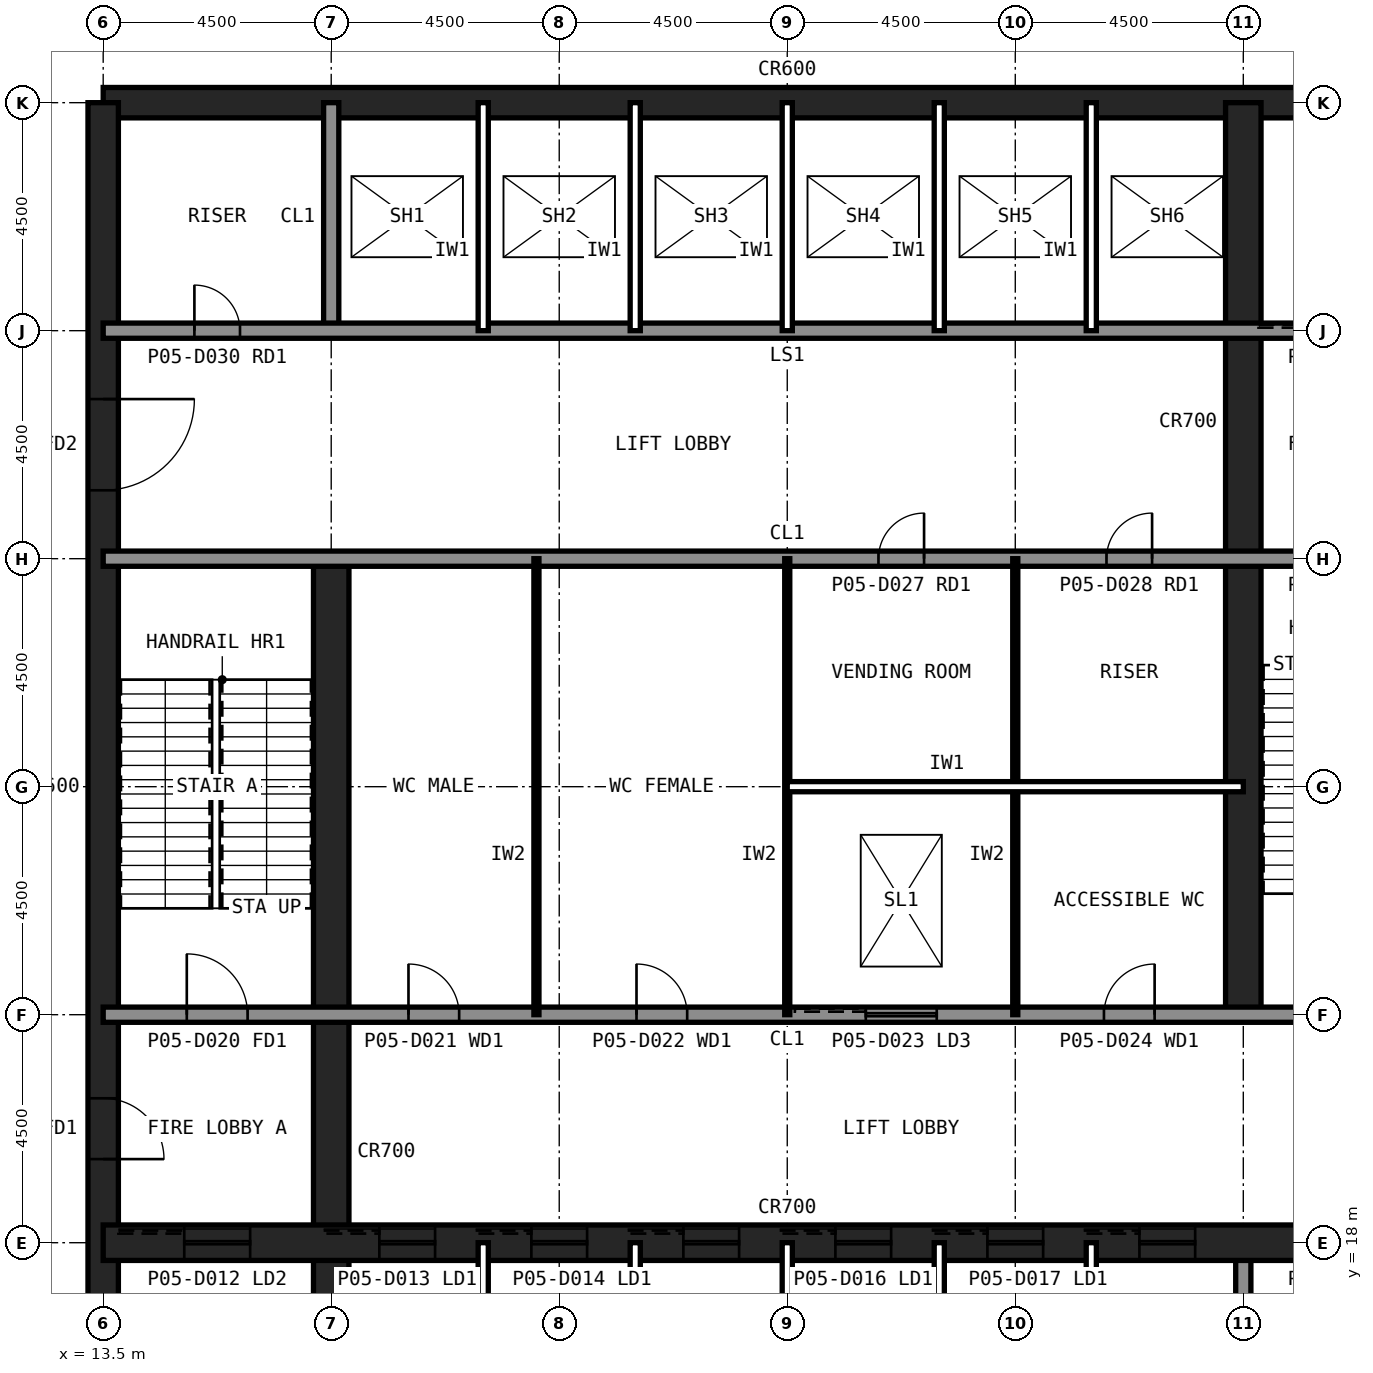
"""IFC4 building model, lengths in metres.
Left out: names, types, materials, properties, quantities, classifications, styles, units other than length and angle.
Written with IfcOpenShell. Run it as: python <this file> out.ifc"""

import sys

from ifc_helpers import new_model, si_unit, direction, frame, frame_2d, origin, place, context, subcontext, project, spatial, rectangle, extrude, element, fill, save


model = new_model("IFC4")
c1 = context("Model", 3, precision=1e-05, world=origin(), true_north=direction((0.0, 1.0)))
c2 = subcontext(c1, "Body", "Model", "MODEL_VIEW")
j1 = project(units=[si_unit("LENGTHUNIT", "METRE"), si_unit("PLANEANGLEUNIT", "RADIAN")], contexts=[c1])
p1 = place(None, origin())
s1 = spatial("IfcSite", under=j1, at=p1, CompositionType="ELEMENT")
p2 = place(p1, origin())
s2 = spatial("IfcBuilding", under=s1, at=p2, CompositionType="ELEMENT")
p3 = place(p2, frame((0.0, 0.0, 23.0)))
s3 = spatial("IfcBuildingStorey", under=s2, at=p3, CompositionType="ELEMENT", Elevation=23.0)
p4 = place(p3, frame((40.5, 40.5, 0.0), z_axis=(0.0, 0.0, 1.0), x_axis=(-1.0, 0.0, 0.0)))
e1 = element("IfcWall", 1, at=p4, inside=s3, PredefinedType="SHEAR", context=c2, shape_type="SweptSolid", body=[
    extrude(rectangle(XDim=27.0, YDim=0.6, at=frame_2d((13.5, 0.0))), origin(), (0.0, 0.0, 1.0), 6.0),
])
p5 = place(p3, frame((13.5, 40.5, 0.0), z_axis=(0.0, 0.0, 1.0), x_axis=(0.0, -1.0, 0.0)))
e2 = element("IfcWall", 2, at=p5, inside=s3, PredefinedType="SHEAR", context=c2, shape_type="SweptSolid", body=[
    extrude(rectangle(XDim=27.0, YDim=0.6, at=frame_2d((13.5, 0.0))), origin(), (0.0, 0.0, 1.0), 6.0),
])
p6 = place(p5, frame((19.65, 0.0, 0.0)))
e3 = element("IfcOpeningElement", 3, at=p6, cuts=e2, PredefinedType="OPENING", context=c2, shape_type="SweptSolid", body=[
    extrude(rectangle(XDim=1.2, YDim=2.1, at=frame_2d((0.6, 1.05))), frame((0.0, 0.31, 0.0), z_axis=(0.0, -1.0, 0.0), x_axis=(1.0, 0.0, 0.0)), (0.0, 0.0, 1.0), 0.62),
])
p7 = place(p5, frame((5.85, 0.0, 0.0)))
e4 = element("IfcOpeningElement", 4, at=p7, cuts=e2, PredefinedType="OPENING", context=c2, shape_type="SweptSolid", body=[
    extrude(rectangle(XDim=1.8, YDim=2.1, at=frame_2d((0.9, 1.05))), frame((0.0, 0.31, 0.0), z_axis=(0.0, -1.0, 0.0), x_axis=(1.0, 0.0, 0.0)), (0.0, 0.0, 1.0), 0.62),
])
p8 = place(p3, frame((18.0, 13.5, 0.0), z_axis=(0.0, 0.0, 1.0), x_axis=(0.0, 1.0, 0.0)))
e5 = element("IfcWall", 5, at=p8, inside=s3, PredefinedType="SHEAR", context=c2, shape_type="SweptSolid", body=[
    extrude(rectangle(XDim=18.0, YDim=0.7, at=frame_2d((9.0, 0.0))), origin(), (0.0, 0.0, 1.0), 6.0),
])
for number, where, z_axis, x_axis in (
    (6, (18.0, 36.0, 0.0), (0.0, 0.0, 1.0), (0.0, 1.0, 0.0)),
    (7, (36.0, 13.5, 0.0), (0.0, 0.0, 1.0), (0.0, 1.0, 0.0)),
):
    element("IfcWall", number, at=place(p3, frame(where, z_axis=z_axis, x_axis=x_axis)), inside=s3, PredefinedType="SOLIDWALL", context=c2, shape_type="SweptSolid", body=[
        extrude(rectangle(XDim=4.5, YDim=0.3, at=frame_2d((2.25, 0.0))), origin(), (0.0, 0.0, 1.0), 5.84),
    ])
p9 = place(p3, frame((36.0, 22.5, 0.0), z_axis=(0.0, 0.0, 1.0), x_axis=(0.0, 1.0, 0.0)))
e8 = element("IfcWall", 8, at=p9, inside=s3, PredefinedType="SHEAR", context=c2, shape_type="SweptSolid", body=[
    extrude(rectangle(XDim=18.0, YDim=0.7, at=frame_2d((9.0, 0.0))), origin(), (0.0, 0.0, 1.0), 6.0),
])
p10 = place(p3, frame((13.5, 18.0, 0.0), z_axis=(0.0, 0.0, 1.0), x_axis=(1.0, 0.0, 0.0)))
e9 = element("IfcWall", 9, at=p10, inside=s3, PredefinedType="SHEAR", context=c2, shape_type="SweptSolid", body=[
    extrude(rectangle(XDim=27.0, YDim=0.7, at=frame_2d((13.5, 0.0))), origin(), (0.0, 0.0, 1.0), 6.0),
])
p11 = place(p10, frame((24.3, 0.0, 0.0)))
e10 = element("IfcOpeningElement", 10, at=p11, cuts=e9, PredefinedType="OPENING", context=c2, shape_type="SweptSolid", body=[
    extrude(rectangle(XDim=0.9, YDim=2.1, at=frame_2d((0.45, 1.05))), frame((0.0, 0.36, 0.0), z_axis=(0.0, -1.0, 0.0), x_axis=(1.0, 0.0, 0.0)), (0.0, 0.0, 1.0), 0.72),
])
p12 = place(p10, frame((5.45, 0.0, 0.0)))
e11 = element("IfcOpeningElement", 11, at=p12, cuts=e9, PredefinedType="OPENING", context=c2, shape_type="SweptSolid", body=[
    extrude(rectangle(XDim=1.1, YDim=2.1, at=frame_2d((0.55, 1.05))), frame((0.0, 0.36, 0.0), z_axis=(0.0, -1.0, 0.0), x_axis=(1.0, 0.0, 0.0)), (0.0, 0.0, 1.0), 0.72),
])
p13 = place(p10, frame((8.45, 0.0, 0.0)))
e12 = element("IfcOpeningElement", 12, at=p13, cuts=e9, PredefinedType="OPENING", context=c2, shape_type="SweptSolid", body=[
    extrude(rectangle(XDim=1.1, YDim=2.1, at=frame_2d((0.55, 1.05))), frame((0.0, 0.36, 0.0), z_axis=(0.0, -1.0, 0.0), x_axis=(1.0, 0.0, 0.0)), (0.0, 0.0, 1.0), 0.72),
])
p14 = place(p10, frame((11.45, 0.0, 0.0)))
e13 = element("IfcOpeningElement", 13, at=p14, cuts=e9, PredefinedType="OPENING", context=c2, shape_type="SweptSolid", body=[
    extrude(rectangle(XDim=1.1, YDim=2.1, at=frame_2d((0.55, 1.05))), frame((0.0, 0.36, 0.0), z_axis=(0.0, -1.0, 0.0), x_axis=(1.0, 0.0, 0.0)), (0.0, 0.0, 1.0), 0.72),
])
p15 = place(p10, frame((14.45, 0.0, 0.0)))
e14 = element("IfcOpeningElement", 14, at=p15, cuts=e9, PredefinedType="OPENING", context=c2, shape_type="SweptSolid", body=[
    extrude(rectangle(XDim=1.1, YDim=2.1, at=frame_2d((0.55, 1.05))), frame((0.0, 0.36, 0.0), z_axis=(0.0, -1.0, 0.0), x_axis=(1.0, 0.0, 0.0)), (0.0, 0.0, 1.0), 0.72),
])
p16 = place(p10, frame((17.45, 0.0, 0.0)))
e15 = element("IfcOpeningElement", 15, at=p16, cuts=e9, PredefinedType="OPENING", context=c2, shape_type="SweptSolid", body=[
    extrude(rectangle(XDim=1.1, YDim=2.1, at=frame_2d((0.55, 1.05))), frame((0.0, 0.36, 0.0), z_axis=(0.0, -1.0, 0.0), x_axis=(1.0, 0.0, 0.0)), (0.0, 0.0, 1.0), 0.72),
])
p17 = place(p10, frame((20.45, 0.0, 0.0)))
e16 = element("IfcOpeningElement", 16, at=p17, cuts=e9, PredefinedType="OPENING", context=c2, shape_type="SweptSolid", body=[
    extrude(rectangle(XDim=1.1, YDim=2.1, at=frame_2d((0.55, 1.05))), frame((0.0, 0.36, 0.0), z_axis=(0.0, -1.0, 0.0), x_axis=(1.0, 0.0, 0.0)), (0.0, 0.0, 1.0), 0.72),
])
p18 = place(p10, frame((1.6, 0.0, 0.0)))
e17 = element("IfcOpeningElement", 17, at=p18, cuts=e9, PredefinedType="OPENING", context=c2, shape_type="SweptSolid", body=[
    extrude(rectangle(XDim=1.3, YDim=2.2, at=frame_2d((0.65, 1.1))), frame((0.0, 0.36, 0.0), z_axis=(0.0, -1.0, 0.0), x_axis=(1.0, 0.0, 0.0)), (0.0, 0.0, 1.0), 0.72),
])
p19 = place(p3, frame((13.5, 36.0, 0.0), z_axis=(0.0, 0.0, 1.0), x_axis=(1.0, 0.0, 0.0)))
e18 = element("IfcWall", 18, at=p19, inside=s3, PredefinedType="SOLIDWALL", context=c2, shape_type="SweptSolid", body=[
    extrude(rectangle(XDim=27.0, YDim=0.3, at=frame_2d((13.5, 0.0))), origin(), (0.0, 0.0, 1.0), 5.84),
])
p20 = place(p19, frame((1.8, 0.0, 0.0)))
e19 = element("IfcOpeningElement", 19, at=p20, cuts=e18, PredefinedType="OPENING", context=c2, shape_type="SweptSolid", body=[
    extrude(rectangle(XDim=0.9, YDim=2.1, at=frame_2d((0.45, 1.05))), frame((0.0, 0.16, 0.0), z_axis=(0.0, -1.0, 0.0), x_axis=(1.0, 0.0, 0.0)), (0.0, 0.0, 1.0), 0.32),
])
p21 = place(p19, frame((24.1, 0.0, 0.0)))
e20 = element("IfcOpeningElement", 20, at=p21, cuts=e18, PredefinedType="OPENING", context=c2, shape_type="SweptSolid", body=[
    extrude(rectangle(XDim=1.3, YDim=2.2, at=frame_2d((0.65, 1.1))), frame((0.0, 0.16, 0.0), z_axis=(0.0, -1.0, 0.0), x_axis=(1.0, 0.0, 0.0)), (0.0, 0.0, 1.0), 0.32),
])
p22 = place(p3, frame((13.5, 22.5, 0.0), z_axis=(0.0, 0.0, 1.0), x_axis=(1.0, 0.0, 0.0)))
e21 = element("IfcWall", 21, at=p22, inside=s3, PredefinedType="SOLIDWALL", context=c2, shape_type="SweptSolid", body=[
    extrude(rectangle(XDim=27.0, YDim=0.3, at=frame_2d((13.5, 0.0))), origin(), (0.0, 0.0, 1.0), 5.84),
])
p23 = place(p22, frame((1.65, 0.0, 0.0)))
e22 = element("IfcOpeningElement", 22, at=p23, cuts=e21, PredefinedType="OPENING", context=c2, shape_type="SweptSolid", body=[
    extrude(rectangle(XDim=1.2, YDim=2.1, at=frame_2d((0.6, 1.05))), frame((0.0, 0.16, 0.0), z_axis=(0.0, -1.0, 0.0), x_axis=(1.0, 0.0, 0.0)), (0.0, 0.0, 1.0), 0.32),
])
p24 = place(p22, frame((6.025, 0.0, 0.0)))
e23 = element("IfcOpeningElement", 23, at=p24, cuts=e21, PredefinedType="OPENING", context=c2, shape_type="SweptSolid", body=[
    extrude(rectangle(XDim=1.0, YDim=2.1, at=frame_2d((0.5, 1.05))), frame((0.0, 0.16, 0.0), z_axis=(0.0, -1.0, 0.0), x_axis=(1.0, 0.0, 0.0)), (0.0, 0.0, 1.0), 0.32),
])
p25 = place(p22, frame((10.525, 0.0, 0.0)))
e24 = element("IfcOpeningElement", 24, at=p25, cuts=e21, PredefinedType="OPENING", context=c2, shape_type="SweptSolid", body=[
    extrude(rectangle(XDim=1.0, YDim=2.1, at=frame_2d((0.5, 1.05))), frame((0.0, 0.16, 0.0), z_axis=(0.0, -1.0, 0.0), x_axis=(1.0, 0.0, 0.0)), (0.0, 0.0, 1.0), 0.32),
])
p26 = place(p22, frame((19.75, 0.0, 0.0)))
e25 = element("IfcOpeningElement", 25, at=p26, cuts=e21, PredefinedType="OPENING", context=c2, shape_type="SweptSolid", body=[
    extrude(rectangle(XDim=1.0, YDim=2.1, at=frame_2d((0.5, 1.05))), frame((0.0, 0.16, 0.0), z_axis=(0.0, -1.0, 0.0), x_axis=(1.0, 0.0, 0.0)), (0.0, 0.0, 1.0), 0.32),
])
p27 = place(p22, frame((15.05, 0.0, 0.0)))
e26 = element("IfcOpeningElement", 26, at=p27, cuts=e21, PredefinedType="OPENING", context=c2, shape_type="SweptSolid", body=[
    extrude(rectangle(XDim=1.4, YDim=2.4, at=frame_2d((0.7, 1.2))), frame((0.0, 0.16, 0.0), z_axis=(0.0, -1.0, 0.0), x_axis=(1.0, 0.0, 0.0)), (0.0, 0.0, 1.0), 0.32),
])
p28 = place(p3, frame((13.5, 31.5, 0.0), z_axis=(0.0, 0.0, 1.0), x_axis=(1.0, 0.0, 0.0)))
e27 = element("IfcWall", 27, at=p28, inside=s3, PredefinedType="SOLIDWALL", context=c2, shape_type="SweptSolid", body=[
    extrude(rectangle(XDim=27.0, YDim=0.3, at=frame_2d((13.5, 0.0))), origin(), (0.0, 0.0, 1.0), 5.84),
])
p29 = place(p28, frame((24.15, 0.0, 0.0)))
e28 = element("IfcOpeningElement", 28, at=p29, cuts=e27, PredefinedType="OPENING", context=c2, shape_type="SweptSolid", body=[
    extrude(rectangle(XDim=1.2, YDim=2.1, at=frame_2d((0.6, 1.05))), frame((0.0, 0.16, 0.0), z_axis=(0.0, -1.0, 0.0), x_axis=(1.0, 0.0, 0.0)), (0.0, 0.0, 1.0), 0.32),
])
p30 = place(p28, frame((15.3, 0.0, 0.0)))
e29 = element("IfcOpeningElement", 29, at=p30, cuts=e27, PredefinedType="OPENING", context=c2, shape_type="SweptSolid", body=[
    extrude(rectangle(XDim=0.9, YDim=2.1, at=frame_2d((0.45, 1.05))), frame((0.0, 0.16, 0.0), z_axis=(0.0, -1.0, 0.0), x_axis=(1.0, 0.0, 0.0)), (0.0, 0.0, 1.0), 0.32),
])
p31 = place(p28, frame((19.8, 0.0, 0.0)))
e30 = element("IfcOpeningElement", 30, at=p31, cuts=e27, PredefinedType="OPENING", context=c2, shape_type="SweptSolid", body=[
    extrude(rectangle(XDim=0.9, YDim=2.1, at=frame_2d((0.45, 1.05))), frame((0.0, 0.16, 0.0), z_axis=(0.0, -1.0, 0.0), x_axis=(1.0, 0.0, 0.0)), (0.0, 0.0, 1.0), 0.32),
])
for number, where, z_axis, x_axis in (
    (31, (21.0, 13.5, 0.0), (0.0, 0.0, 1.0), (0.0, 1.0, 0.0)),
    (32, (21.0, 36.0, 0.0), (0.0, 0.0, 1.0), (0.0, 1.0, 0.0)),
    (33, (24.0, 13.5, 0.0), (0.0, 0.0, 1.0), (0.0, 1.0, 0.0)),
    (34, (24.0, 36.0, 0.0), (0.0, 0.0, 1.0), (0.0, 1.0, 0.0)),
    (35, (27.0, 13.5, 0.0), (0.0, 0.0, 1.0), (0.0, 1.0, 0.0)),
    (36, (27.0, 36.0, 0.0), (0.0, 0.0, 1.0), (0.0, 1.0, 0.0)),
    (37, (30.0, 13.5, 0.0), (0.0, 0.0, 1.0), (0.0, 1.0, 0.0)),
    (38, (30.0, 36.0, 0.0), (0.0, 0.0, 1.0), (0.0, 1.0, 0.0)),
    (39, (33.0, 13.5, 0.0), (0.0, 0.0, 1.0), (0.0, 1.0, 0.0)),
    (40, (33.0, 36.0, 0.0), (0.0, 0.0, 1.0), (0.0, 1.0, 0.0)),
):
    element("IfcWall", number, at=place(p3, frame(where, z_axis=z_axis, x_axis=x_axis)), inside=s3, PredefinedType="PARTITIONING", context=c2, shape_type="SweptSolid", body=[
        extrude(rectangle(XDim=4.5, YDim=0.2, at=frame_2d((2.25, 0.0))), origin(), (0.0, 0.0, 1.0), 5.84),
    ])
for number, where, z_axis, x_axis in (
    (41, (22.05, 22.5, 0.0), (0.0, 0.0, 1.0), (0.0, 1.0, 0.0)),
    (42, (27.0, 22.5, 0.0), (0.0, 0.0, 1.0), (0.0, 1.0, 0.0)),
    (43, (31.5, 22.5, 0.0), (0.0, 0.0, 1.0), (0.0, 1.0, 0.0)),
):
    element("IfcWall", number, at=place(p3, frame(where, z_axis=z_axis, x_axis=x_axis)), inside=s3, PredefinedType="PLUMBINGWALL", context=c2, shape_type="SweptSolid", body=[
        extrude(rectangle(XDim=9.0, YDim=0.1, at=frame_2d((4.5, 0.0))), origin(), (0.0, 0.0, 1.0), 5.84),
    ])
p32 = place(p3, frame((27.0, 27.0, 0.0), z_axis=(0.0, 0.0, 1.0), x_axis=(1.0, 0.0, 0.0)))
e44 = element("IfcWall", 44, at=p32, inside=s3, PredefinedType="PARTITIONING", context=c2, shape_type="SweptSolid", body=[
    extrude(rectangle(XDim=9.0, YDim=0.2, at=frame_2d((4.5, 0.0))), origin(), (0.0, 0.0, 1.0), 5.84),
])
p33 = place(p6, origin())
e45 = element("IfcDoor", 45, at=p33, inside=s3, OperationType="SINGLE_SWING_RIGHT", PredefinedType="DOOR", context=c2, shape_type="SweptSolid", body=[
    extrude(rectangle(XDim=1.2, YDim=2.1, at=frame_2d((0.6, 1.05))), frame((0.0, 0.025, 0.0), z_axis=(0.0, -1.0, 0.0), x_axis=(1.0, 0.0, 0.0)), (0.0, 0.0, 1.0), 0.05),
])
fill(e3, e45)
p34 = place(p7, origin())
e46 = element("IfcDoor", 46, at=p34, inside=s3, OperationType="SINGLE_SWING_LEFT", PredefinedType="DOOR", context=c2, shape_type="SweptSolid", body=[
    extrude(rectangle(XDim=1.8, YDim=2.1, at=frame_2d((0.9, 1.05))), frame((0.0, 0.025, 0.0), z_axis=(0.0, -1.0, 0.0), x_axis=(1.0, 0.0, 0.0)), (0.0, 0.0, 1.0), 0.05),
])
fill(e4, e46)
p35 = place(p23, origin())
e47 = element("IfcDoor", 47, at=p35, inside=s3, OperationType="SINGLE_SWING_LEFT", PredefinedType="DOOR", context=c2, shape_type="SweptSolid", body=[
    extrude(rectangle(XDim=1.2, YDim=2.1, at=frame_2d((0.6, 1.05))), frame((0.0, 0.025, 0.0), z_axis=(0.0, -1.0, 0.0), x_axis=(1.0, 0.0, 0.0)), (0.0, 0.0, 1.0), 0.05),
])
fill(e22, e47)
p36 = place(p24, origin())
e48 = element("IfcDoor", 48, at=p36, inside=s3, OperationType="SINGLE_SWING_LEFT", PredefinedType="DOOR", context=c2, shape_type="SweptSolid", body=[
    extrude(rectangle(XDim=1.0, YDim=2.1, at=frame_2d((0.5, 1.05))), frame((0.0, 0.025, 0.0), z_axis=(0.0, -1.0, 0.0), x_axis=(1.0, 0.0, 0.0)), (0.0, 0.0, 1.0), 0.05),
])
fill(e23, e48)
p37 = place(p25, origin())
e49 = element("IfcDoor", 49, at=p37, inside=s3, OperationType="SINGLE_SWING_LEFT", PredefinedType="DOOR", context=c2, shape_type="SweptSolid", body=[
    extrude(rectangle(XDim=1.0, YDim=2.1, at=frame_2d((0.5, 1.05))), frame((0.0, 0.025, 0.0), z_axis=(0.0, -1.0, 0.0), x_axis=(1.0, 0.0, 0.0)), (0.0, 0.0, 1.0), 0.05),
])
fill(e24, e49)
p38 = place(p26, origin())
e50 = element("IfcDoor", 50, at=p38, inside=s3, OperationType="SINGLE_SWING_RIGHT", PredefinedType="DOOR", context=c2, shape_type="SweptSolid", body=[
    extrude(rectangle(XDim=1.0, YDim=2.1, at=frame_2d((0.5, 1.05))), frame((0.0, 0.025, 0.0), z_axis=(0.0, -1.0, 0.0), x_axis=(1.0, 0.0, 0.0)), (0.0, 0.0, 1.0), 0.05),
])
fill(e25, e50)
p39 = place(p30, origin())
e51 = element("IfcDoor", 51, at=p39, inside=s3, OperationType="SINGLE_SWING_RIGHT", PredefinedType="DOOR", context=c2, shape_type="SweptSolid", body=[
    extrude(rectangle(XDim=0.9, YDim=2.1, at=frame_2d((0.45, 1.05))), frame((0.0, 0.025, 0.0), z_axis=(0.0, -1.0, 0.0), x_axis=(1.0, 0.0, 0.0)), (0.0, 0.0, 1.0), 0.05),
])
fill(e29, e51)
p40 = place(p31, origin())
e52 = element("IfcDoor", 52, at=p40, inside=s3, OperationType="SINGLE_SWING_RIGHT", PredefinedType="DOOR", context=c2, shape_type="SweptSolid", body=[
    extrude(rectangle(XDim=0.9, YDim=2.1, at=frame_2d((0.45, 1.05))), frame((0.0, 0.025, 0.0), z_axis=(0.0, -1.0, 0.0), x_axis=(1.0, 0.0, 0.0)), (0.0, 0.0, 1.0), 0.05),
])
fill(e30, e52)
p41 = place(p20, origin())
e53 = element("IfcDoor", 53, at=p41, inside=s3, OperationType="SINGLE_SWING_LEFT", PredefinedType="DOOR", context=c2, shape_type="SweptSolid", body=[
    extrude(rectangle(XDim=0.9, YDim=2.1, at=frame_2d((0.45, 1.05))), frame((0.0, 0.025, 0.0), z_axis=(0.0, -1.0, 0.0), x_axis=(1.0, 0.0, 0.0)), (0.0, 0.0, 1.0), 0.05),
])
fill(e19, e53)
p42 = place(p12, origin())
e54 = element("IfcDoor", 54, at=p42, inside=s3, OperationType="SLIDING_TO_LEFT", PredefinedType="DOOR", context=c2, shape_type="SweptSolid", body=[
    extrude(rectangle(XDim=1.1, YDim=2.1, at=frame_2d((0.55, 1.05))), frame((0.0, 0.025, 0.0), z_axis=(0.0, -1.0, 0.0), x_axis=(1.0, 0.0, 0.0)), (0.0, 0.0, 1.0), 0.05),
])
fill(e11, e54)
p43 = place(p13, origin())
e55 = element("IfcDoor", 55, at=p43, inside=s3, OperationType="SLIDING_TO_LEFT", PredefinedType="DOOR", context=c2, shape_type="SweptSolid", body=[
    extrude(rectangle(XDim=1.1, YDim=2.1, at=frame_2d((0.55, 1.05))), frame((0.0, 0.025, 0.0), z_axis=(0.0, -1.0, 0.0), x_axis=(1.0, 0.0, 0.0)), (0.0, 0.0, 1.0), 0.05),
])
fill(e12, e55)
p44 = place(p14, origin())
e56 = element("IfcDoor", 56, at=p44, inside=s3, OperationType="SLIDING_TO_LEFT", PredefinedType="DOOR", context=c2, shape_type="SweptSolid", body=[
    extrude(rectangle(XDim=1.1, YDim=2.1, at=frame_2d((0.55, 1.05))), frame((0.0, 0.025, 0.0), z_axis=(0.0, -1.0, 0.0), x_axis=(1.0, 0.0, 0.0)), (0.0, 0.0, 1.0), 0.05),
])
fill(e13, e56)
p45 = place(p15, origin())
e57 = element("IfcDoor", 57, at=p45, inside=s3, OperationType="SLIDING_TO_LEFT", PredefinedType="DOOR", context=c2, shape_type="SweptSolid", body=[
    extrude(rectangle(XDim=1.1, YDim=2.1, at=frame_2d((0.55, 1.05))), frame((0.0, 0.025, 0.0), z_axis=(0.0, -1.0, 0.0), x_axis=(1.0, 0.0, 0.0)), (0.0, 0.0, 1.0), 0.05),
])
fill(e14, e57)
p46 = place(p16, origin())
e58 = element("IfcDoor", 58, at=p46, inside=s3, OperationType="SLIDING_TO_LEFT", PredefinedType="DOOR", context=c2, shape_type="SweptSolid", body=[
    extrude(rectangle(XDim=1.1, YDim=2.1, at=frame_2d((0.55, 1.05))), frame((0.0, 0.025, 0.0), z_axis=(0.0, -1.0, 0.0), x_axis=(1.0, 0.0, 0.0)), (0.0, 0.0, 1.0), 0.05),
])
fill(e15, e58)
p47 = place(p17, origin())
e59 = element("IfcDoor", 59, at=p47, inside=s3, OperationType="SLIDING_TO_LEFT", PredefinedType="DOOR", context=c2, shape_type="SweptSolid", body=[
    extrude(rectangle(XDim=1.1, YDim=2.1, at=frame_2d((0.55, 1.05))), frame((0.0, 0.025, 0.0), z_axis=(0.0, -1.0, 0.0), x_axis=(1.0, 0.0, 0.0)), (0.0, 0.0, 1.0), 0.05),
])
fill(e16, e59)
p48 = place(p18, origin())
e60 = element("IfcDoor", 60, at=p48, inside=s3, OperationType="SLIDING_TO_LEFT", PredefinedType="DOOR", context=c2, shape_type="SweptSolid", body=[
    extrude(rectangle(XDim=1.3, YDim=2.2, at=frame_2d((0.65, 1.1))), frame((0.0, 0.025, 0.0), z_axis=(0.0, -1.0, 0.0), x_axis=(1.0, 0.0, 0.0)), (0.0, 0.0, 1.0), 0.05),
])
fill(e17, e60)
p49 = place(p27, origin())
e61 = element("IfcDoor", 61, at=p49, inside=s3, OperationType="SLIDING_TO_LEFT", PredefinedType="DOOR", context=c2, shape_type="SweptSolid", body=[
    extrude(rectangle(XDim=1.4, YDim=2.4, at=frame_2d((0.7, 1.2))), frame((0.0, 0.025, 0.0), z_axis=(0.0, -1.0, 0.0), x_axis=(1.0, 0.0, 0.0)), (0.0, 0.0, 1.0), 0.05),
])
fill(e26, e61)
save(model, sys.argv[1])
